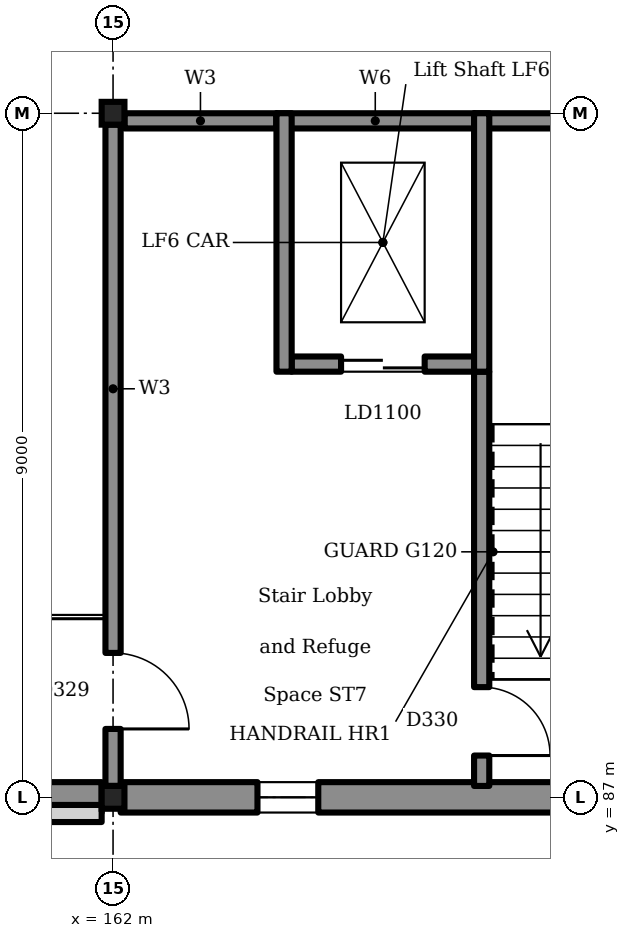
"""IFC4 building model, lengths in metres.
Left out: names, types, materials, properties, quantities, classifications, styles, units other than length and angle.
Written with IfcOpenShell. Run it as: python <this file> out.ifc"""

import sys

from ifc_helpers import new_model, si_unit, direction, frame, frame_2d, origin, origin_2d, place, context, subcontext, project, spatial, rectangle, i_section, extrude, element, fill, save


model = new_model("IFC4")
c1 = context("Model", 3, precision=1e-05, world=origin(), true_north=direction((0.0, 1.0)))
c2 = subcontext(c1, "Body", "Model", "MODEL_VIEW")
j1 = project(units=[si_unit("LENGTHUNIT", "METRE"), si_unit("PLANEANGLEUNIT", "RADIAN")], contexts=[c1])
p1 = place(None, origin())
s1 = spatial("IfcSite", under=j1, at=p1, CompositionType="ELEMENT")
p2 = place(p1, origin())
s2 = spatial("IfcBuilding", under=s1, at=p2, CompositionType="ELEMENT")
p3 = place(p2, frame((0.0, 0.0, 9.9)))
s3 = spatial("IfcBuildingStorey", under=s2, at=p3, CompositionType="ELEMENT", Elevation=9.9)
for number, where, z_axis, x_axis in (
    (1, (162.0, 87.0, 0.0), (0.0, 0.0, 1.0), (1.0, 0.0, 0.0)),
    (2, (162.0, 96.0, 0.0), (0.0, 0.0, 1.0), (1.0, 0.0, 0.0)),
):
    element("IfcColumn", number, at=place(p3, frame(where, z_axis=z_axis, x_axis=x_axis)), inside=s3, PredefinedType="COLUMN", context=c2, shape_type="SweptSolid", body=[
        extrude(i_section(OverallWidth=0.3, OverallDepth=0.3, WebThickness=0.011, FlangeThickness=0.019, FilletRadius=0.027, at=origin_2d()), origin(), (0.0, 0.0, 1.0), 4.5),
    ])
p4 = place(p3, frame((154.15, 87.0, 0.0), z_axis=(0.0, 0.0, 1.0), x_axis=(1.0, 0.0, 0.0)))
e3 = element("IfcWall", 3, at=p4, inside=s3, PredefinedType="SOLIDWALL", context=c2, shape_type="SweptSolid", body=[
    extrude(rectangle(XDim=7.7, YDim=0.4, at=frame_2d((3.85, 0.0))), origin(), (0.0, 0.0, 1.0), 2.85),
])
p5 = place(p4, frame((3.45, 0.0, 0.9)))
e4 = element("IfcOpeningElement", 4, at=p5, cuts=e3, PredefinedType="OPENING", context=c2, shape_type="SweptSolid", body=[
    extrude(rectangle(XDim=0.8, YDim=1.8, at=frame_2d((0.4, 0.9))), frame((0.0, 0.21, 0.0), z_axis=(0.0, -1.0, 0.0), x_axis=(1.0, 0.0, 0.0)), (0.0, 0.0, 1.0), 0.42),
])
p6 = place(p3, frame((162.1, 87.0, 0.0), z_axis=(0.0, 0.0, 1.0), x_axis=(1.0, 0.0, 0.0)))
e5 = element("IfcWall", 5, at=p6, inside=s3, PredefinedType="SOLIDWALL", context=c2, shape_type="SweptSolid", body=[
    extrude(rectangle(XDim=7.75, YDim=0.4, at=frame_2d((3.875, 0.0))), origin(), (0.0, 0.0, 1.0), 4.25),
])
p7 = place(p6, frame((1.8, 0.0, 0.9)))
e6 = element("IfcOpeningElement", 6, at=p7, cuts=e5, PredefinedType="OPENING", context=c2, shape_type="SweptSolid", body=[
    extrude(rectangle(XDim=0.8, YDim=1.8, at=frame_2d((0.4, 0.9))), frame((0.0, 0.21, 0.0), z_axis=(0.0, -1.0, 0.0), x_axis=(1.0, 0.0, 0.0)), (0.0, 0.0, 1.0), 0.42),
])
p8 = place(p3, frame((158.0, 86.788, 2.85), z_axis=(0.0, 0.0, 1.0), x_axis=(1.0, 0.0, 0.0)))
e7 = element("IfcWall", 7, at=p8, inside=s3, PredefinedType="SOLIDWALL", context=c2, shape_type="SweptSolid", body=[
    extrude(rectangle(XDim=3.85, YDim=0.225, at=frame_2d((1.925, 0.0))), origin(), (0.0, 0.0, 1.0), 4.65),
])
p9 = place(p2, frame((0.0, 0.0, 5.4)))
s4 = spatial("IfcBuildingStorey", under=s2, at=p9, CompositionType="ELEMENT", Elevation=5.4)
p10 = place(p9, frame((146.15, 96.0, 1.8), z_axis=(0.0, 0.0, 1.0), x_axis=(1.0, 0.0, 0.0)))
e8 = element("IfcWall", 8, at=p10, inside=s4, PredefinedType="SOLIDWALL", context=c2, shape_type="SweptSolid", body=[
    extrude(rectangle(XDim=15.7, YDim=0.3, at=frame_2d((7.85, 0.0))), origin(), (0.0, 0.0, 1.0), 5.55),
])
p11 = place(p3, frame((162.0, 87.15, 0.0), z_axis=(0.0, 0.0, 1.0), x_axis=(0.0, 1.0, 0.0)))
e9 = element("IfcWall", 9, at=p11, inside=s3, PredefinedType="SOLIDWALL", context=c2, shape_type="SweptSolid", body=[
    extrude(rectangle(XDim=8.7, YDim=0.2, at=frame_2d((4.35, 0.0))), origin(), (0.0, 0.0, 1.0), 4.25),
])
p12 = place(p11, frame((0.75, 0.0, 0.0)))
e10 = element("IfcOpeningElement", 10, at=p12, cuts=e9, PredefinedType="OPENING", context=c2, shape_type="SweptSolid", body=[
    extrude(rectangle(XDim=1.0, YDim=2.1, at=frame_2d((0.5, 1.05))), frame((0.0, 0.11, 0.0), z_axis=(0.0, -1.0, 0.0), x_axis=(1.0, 0.0, 0.0)), (0.0, 0.0, 1.0), 0.22),
])
p13 = place(p3, frame((162.15, 95.9, 0.0), z_axis=(0.0, 0.0, 1.0), x_axis=(1.0, 0.0, 0.0)))
e11 = element("IfcWall", 11, at=p13, inside=s3, PredefinedType="SOLIDWALL", context=c2, shape_type="SweptSolid", body=[
    extrude(rectangle(XDim=2.0, YDim=0.2, at=frame_2d((1.0, 0.0))), origin(), (0.0, 0.0, 1.0), 4.25),
])
p14 = place(p3, frame((166.75, 95.9, 0.0), z_axis=(0.0, 0.0, 1.0), x_axis=(1.0, 0.0, 0.0)))
e12 = element("IfcWall", 12, at=p14, inside=s3, PredefinedType="SOLIDWALL", context=c2, shape_type="SweptSolid", body=[
    extrude(rectangle(XDim=3.1, YDim=0.2, at=frame_2d((1.55, 0.0))), origin(), (0.0, 0.0, 1.0), 4.25),
])
p15 = place(p3, frame((166.85, 87.15, 0.0), z_axis=(0.0, 0.0, 1.0), x_axis=(0.0, 1.0, 0.0)))
e13 = element("IfcWall", 13, at=p15, inside=s3, PredefinedType="SOLIDWALL", context=c2, shape_type="SweptSolid", body=[
    extrude(rectangle(XDim=5.45, YDim=0.2, at=frame_2d((2.725, 0.0))), origin(), (0.0, 0.0, 1.0), 4.25),
])
p16 = place(p15, frame((0.4, 0.0, 0.0)))
e14 = element("IfcOpeningElement", 14, at=p16, cuts=e13, PredefinedType="OPENING", context=c2, shape_type="SweptSolid", body=[
    extrude(rectangle(XDim=0.9, YDim=2.1, at=frame_2d((0.45, 1.05))), frame((0.0, 0.11, 0.0), z_axis=(0.0, -1.0, 0.0), x_axis=(1.0, 0.0, 0.0)), (0.0, 0.0, 1.0), 0.22),
])
p17 = place(p3, frame((164.15, 95.9, 0.0), z_axis=(0.0, 0.0, 1.0), x_axis=(1.0, 0.0, 0.0)))
e15 = element("IfcWall", 15, at=p17, inside=s3, PredefinedType="SOLIDWALL", context=c2, shape_type="SweptSolid", body=[
    extrude(rectangle(XDim=2.6, YDim=0.2, at=frame_2d((1.3, 0.0))), origin(), (0.0, 0.0, 1.0), 4.5),
])
p18 = place(p3, frame((164.35, 92.7, 0.0), z_axis=(0.0, 0.0, 1.0), x_axis=(1.0, 0.0, 0.0)))
e16 = element("IfcWall", 16, at=p18, inside=s3, PredefinedType="SOLIDWALL", context=c2, shape_type="SweptSolid", body=[
    extrude(rectangle(XDim=2.4, YDim=0.2, at=frame_2d((1.2, 0.0))), origin(), (0.0, 0.0, 1.0), 4.5),
])
p19 = place(p18, frame((0.65, 0.0, 0.0)))
e17 = element("IfcOpeningElement", 17, at=p19, cuts=e16, PredefinedType="OPENING", context=c2, shape_type="SweptSolid", body=[
    extrude(rectangle(XDim=1.1, YDim=2.1, at=frame_2d((0.55, 1.05))), frame((0.0, 0.11, 0.0), z_axis=(0.0, -1.0, 0.0), x_axis=(1.0, 0.0, 0.0)), (0.0, 0.0, 1.0), 0.22),
])
for number, where, z_axis, x_axis in (
    (18, (164.25, 92.6, 0.0), (0.0, 0.0, 1.0), (0.0, 1.0, 0.0)),
    (19, (166.85, 92.6, 0.0), (0.0, 0.0, 1.0), (0.0, 1.0, 0.0)),
):
    element("IfcWall", number, at=place(p3, frame(where, z_axis=z_axis, x_axis=x_axis)), inside=s3, PredefinedType="SOLIDWALL", context=c2, shape_type="SweptSolid", body=[
        extrude(rectangle(XDim=3.4, YDim=0.2, at=frame_2d((1.7, 0.0))), origin(), (0.0, 0.0, 1.0), 4.5),
    ])
p20 = place(p7, origin())
e20 = element("IfcWindow", 20, at=p20, inside=s3, PartitioningType="SINGLE_PANEL", PredefinedType="WINDOW", context=c2, shape_type="SweptSolid", body=[
    extrude(rectangle(XDim=0.8, YDim=1.8, at=frame_2d((0.4, 0.9))), frame((0.0, 0.03, 0.0), z_axis=(0.0, -1.0, 0.0), x_axis=(1.0, 0.0, 0.0)), (0.0, 0.0, 1.0), 0.06),
])
fill(e6, e20)
p21 = place(p19, origin())
e21 = element("IfcDoor", 21, at=p21, inside=s3, OperationType="SLIDING_TO_LEFT", PredefinedType="DOOR", context=c2, shape_type="SweptSolid", body=[
    extrude(rectangle(XDim=1.1, YDim=2.1, at=frame_2d((0.55, 1.05))), frame((0.0, 0.025, 0.0), z_axis=(0.0, -1.0, 0.0), x_axis=(1.0, 0.0, 0.0)), (0.0, 0.0, 1.0), 0.05),
])
fill(e17, e21)
p22 = place(p12, frame((1.0, 0.0, 0.0), z_axis=(0.0, 0.0, 1.0), x_axis=(-1.0, 0.0, 0.0)))
e22 = element("IfcDoor", 22, at=p22, inside=s3, OperationType="SINGLE_SWING_LEFT", PredefinedType="DOOR", context=c2, shape_type="SweptSolid", body=[
    extrude(rectangle(XDim=1.0, YDim=2.1, at=frame_2d((0.5, 1.05))), frame((0.0, 0.025, 0.0), z_axis=(0.0, -1.0, 0.0), x_axis=(1.0, 0.0, 0.0)), (0.0, 0.0, 1.0), 0.05),
])
fill(e10, e22)
p23 = place(p16, frame((0.9, 0.0, 0.0), z_axis=(0.0, 0.0, 1.0), x_axis=(-1.0, 0.0, 0.0)))
e23 = element("IfcDoor", 23, at=p23, inside=s3, OperationType="SINGLE_SWING_LEFT", PredefinedType="DOOR", context=c2, shape_type="SweptSolid", body=[
    extrude(rectangle(XDim=0.9, YDim=2.1, at=frame_2d((0.45, 1.05))), frame((0.0, 0.025, 0.0), z_axis=(0.0, -1.0, 0.0), x_axis=(1.0, 0.0, 0.0)), (0.0, 0.0, 1.0), 0.05),
])
fill(e14, e23)
save(model, sys.argv[1])
